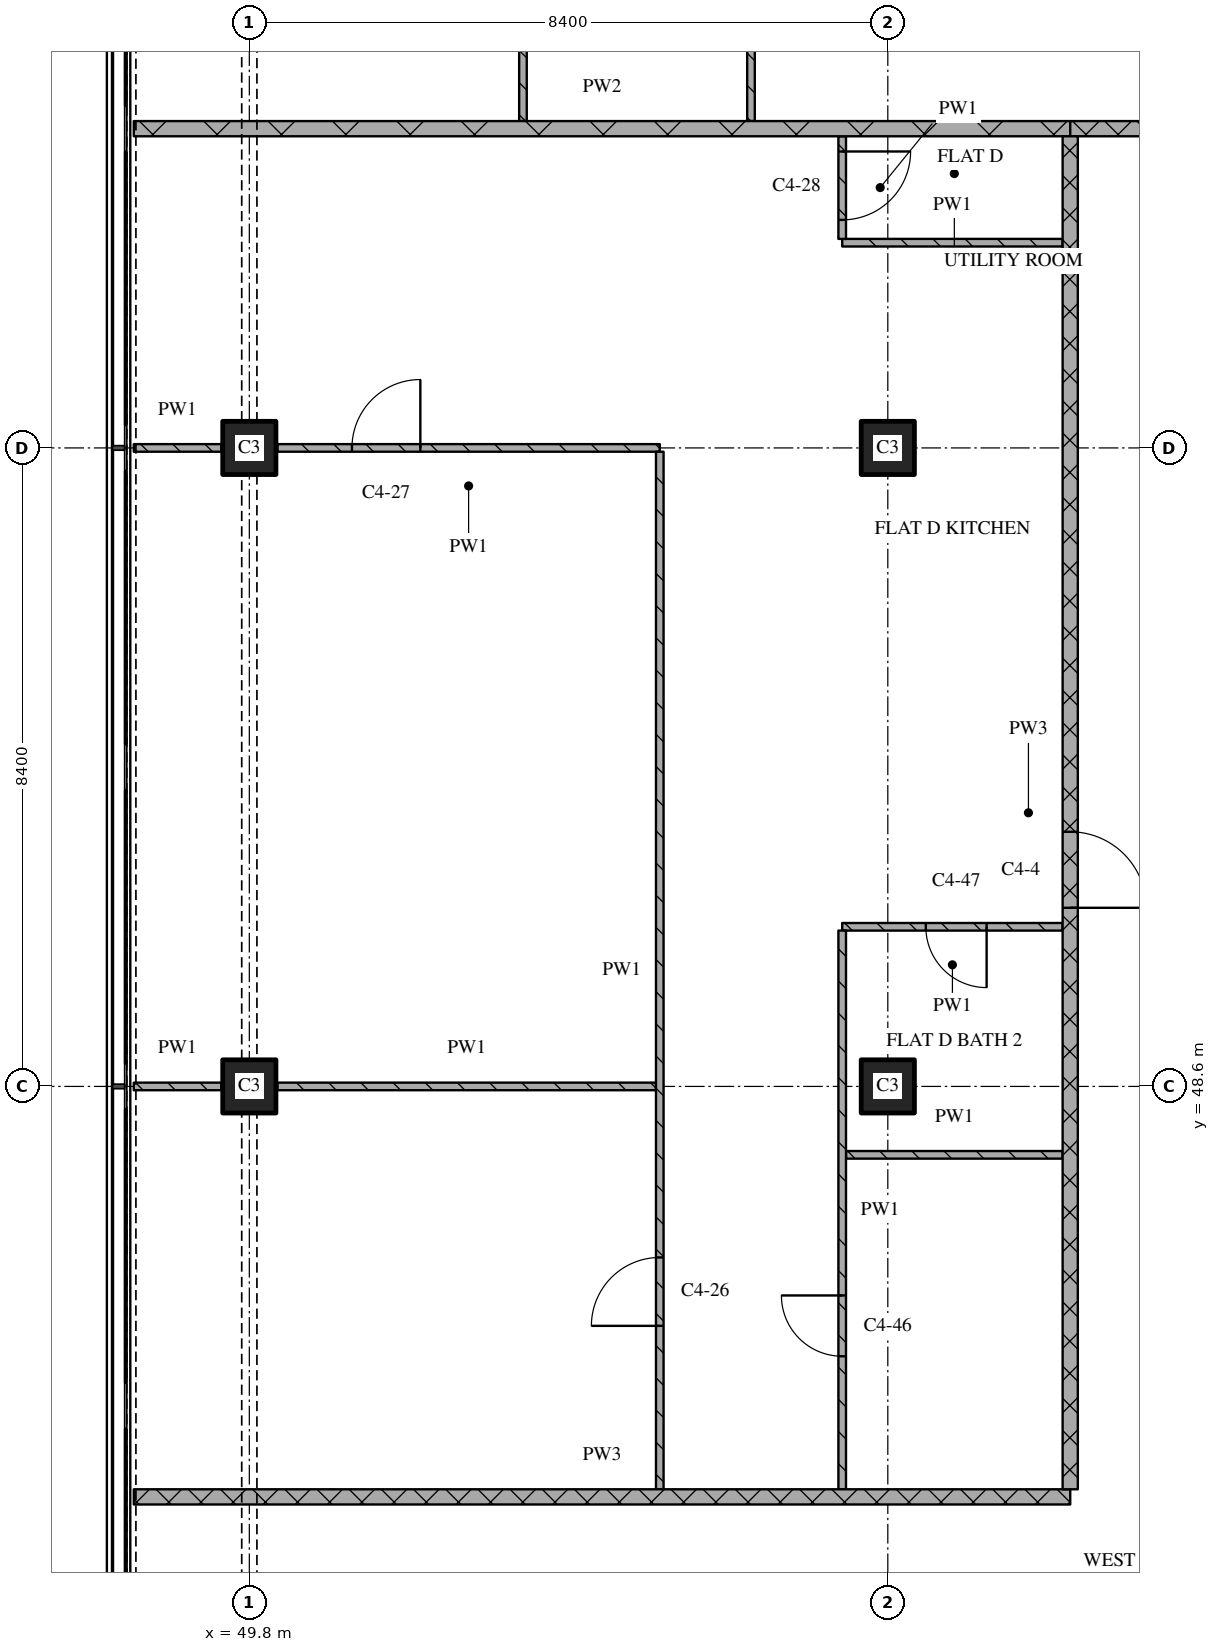
"""IFC4 building model, lengths in metres.
Left out: names, types, materials, properties, quantities, classifications, styles, units other than length and angle.
Written with IfcOpenShell. Run it as: python <this file> out.ifc"""

import sys

from ifc_helpers import new_model, si_unit, direction, frame, frame_2d, origin, origin_2d, place, context, subcontext, project, spatial, rectangle, extrude, element, fill, save


model = new_model("IFC4")
c1 = context("Model", 3, precision=1e-05, world=origin(), true_north=direction((0.0, 1.0)))
c2 = subcontext(c1, "Body", "Model", "MODEL_VIEW")
j1 = project(units=[si_unit("LENGTHUNIT", "METRE"), si_unit("PLANEANGLEUNIT", "RADIAN")], contexts=[c1])
p1 = place(None, origin())
s1 = spatial("IfcSite", under=j1, at=p1, CompositionType="ELEMENT")
p2 = place(p1, origin())
s2 = spatial("IfcBuilding", under=s1, at=p2, CompositionType="ELEMENT")
p3 = place(p2, frame((0.0, 0.0, 179.85)))
s3 = spatial("IfcBuildingStorey", under=s2, at=p3, CompositionType="ELEMENT", Elevation=179.85)
for number, where, z_axis, x_axis in (
    (1, (49.8, 48.6, 0.0), (0.0, 0.0, 1.0), (1.0, 0.0, 0.0)),
    (2, (49.8, 57.0, 0.0), (0.0, 0.0, 1.0), (1.0, 0.0, 0.0)),
    (3, (58.2, 48.6, 0.0), (0.0, 0.0, 1.0), (1.0, 0.0, 0.0)),
    (4, (58.2, 57.0, 0.0), (0.0, 0.0, 1.0), (1.0, 0.0, 0.0)),
):
    element("IfcColumn", number, at=place(p3, frame(where, z_axis=z_axis, x_axis=x_axis)), inside=s3, PredefinedType="COLUMN", context=c2, shape_type="SweptSolid", body=[
        extrude(rectangle(XDim=0.7, YDim=0.7, at=origin_2d()), origin(), (0.0, 0.0, 1.0), 3.6),
    ])
p4 = place(p3, frame((48.28, 43.2, 0.0), z_axis=(0.0, 0.0, 1.0), x_axis=(1.0, 0.0, 0.0)))
e5 = element("IfcWall", 5, at=p4, inside=s3, PredefinedType="PARTITIONING", context=c2, shape_type="SweptSolid", body=[
    extrude(rectangle(XDim=12.32, YDim=0.2, at=frame_2d((6.16, 0.0))), origin(), (0.0, 0.0, 1.0), 3.32),
])
p5 = place(p3, frame((57.65, 47.7, 0.0), z_axis=(0.0, 0.0, 1.0), x_axis=(1.0, 0.0, 0.0)))
e6 = element("IfcWall", 6, at=p5, inside=s3, PredefinedType="PARTITIONING", context=c2, shape_type="SweptSolid", body=[
    extrude(rectangle(XDim=2.85, YDim=0.1, at=frame_2d((1.425, 0.0))), origin(), (0.0, 0.0, 1.0), 3.32),
])
p6 = place(p3, frame((48.28, 48.6, 0.0), z_axis=(0.0, 0.0, 1.0), x_axis=(1.0, 0.0, 0.0)))
e7 = element("IfcWall", 7, at=p6, inside=s3, PredefinedType="PARTITIONING", context=c2, shape_type="SweptSolid", body=[
    extrude(rectangle(XDim=1.15, YDim=0.1, at=frame_2d((0.575, 0.0))), origin(), (0.0, 0.0, 1.0), 3.32),
])
p7 = place(p3, frame((50.17, 48.6, 0.0), z_axis=(0.0, 0.0, 1.0), x_axis=(1.0, 0.0, 0.0)))
e8 = element("IfcWall", 8, at=p7, inside=s3, PredefinedType="PARTITIONING", context=c2, shape_type="SweptSolid", body=[
    extrude(rectangle(XDim=4.98, YDim=0.1, at=frame_2d((2.49, 0.0))), origin(), (0.0, 0.0, 1.0), 3.32),
])
p8 = place(p3, frame((60.5, 50.7, 0.0), z_axis=(0.0, 0.0, 1.0), x_axis=(-1.0, 0.0, 0.0)))
e9 = element("IfcWall", 9, at=p8, inside=s3, PredefinedType="PARTITIONING", context=c2, shape_type="SweptSolid", body=[
    extrude(rectangle(XDim=2.9, YDim=0.1, at=frame_2d((1.45, 0.0))), origin(), (0.0, 0.0, 1.0), 3.32),
])
p9 = place(p8, frame((1.0, 0.0, 0.0)))
e10 = element("IfcOpeningElement", 10, at=p9, cuts=e9, PredefinedType="OPENING", context=c2, shape_type="SweptSolid", body=[
    extrude(rectangle(XDim=0.8, YDim=2.1, at=frame_2d((0.4, 1.05))), frame((0.0, 0.06, 0.0), z_axis=(0.0, -1.0, 0.0), x_axis=(1.0, 0.0, 0.0)), (0.0, 0.0, 1.0), 0.12),
])
p10 = place(p3, frame((48.28, 57.0, 0.0), z_axis=(0.0, 0.0, 1.0), x_axis=(1.0, 0.0, 0.0)))
e11 = element("IfcWall", 11, at=p10, inside=s3, PredefinedType="PARTITIONING", context=c2, shape_type="SweptSolid", body=[
    extrude(rectangle(XDim=1.15, YDim=0.1, at=frame_2d((0.575, 0.0))), origin(), (0.0, 0.0, 1.0), 3.32),
])
p11 = place(p3, frame((55.2, 57.0, 0.0), z_axis=(0.0, 0.0, 1.0), x_axis=(-1.0, 0.0, 0.0)))
e12 = element("IfcWall", 12, at=p11, inside=s3, PredefinedType="PARTITIONING", context=c2, shape_type="SweptSolid", body=[
    extrude(rectangle(XDim=5.03, YDim=0.1, at=frame_2d((2.515, 0.0))), origin(), (0.0, 0.0, 1.0), 3.32),
])
p12 = place(p11, frame((3.15, 0.0, 0.0)))
e13 = element("IfcOpeningElement", 13, at=p12, cuts=e12, PredefinedType="OPENING", context=c2, shape_type="SweptSolid", body=[
    extrude(rectangle(XDim=0.9, YDim=2.1, at=frame_2d((0.45, 1.05))), frame((0.0, 0.06, 0.0), z_axis=(0.0, -1.0, 0.0), x_axis=(1.0, 0.0, 0.0)), (0.0, 0.0, 1.0), 0.12),
])
p13 = place(p3, frame((57.6, 59.7, 0.0), z_axis=(0.0, 0.0, 1.0), x_axis=(1.0, 0.0, 0.0)))
e14 = element("IfcWall", 14, at=p13, inside=s3, PredefinedType="PARTITIONING", context=c2, shape_type="SweptSolid", body=[
    extrude(rectangle(XDim=2.9, YDim=0.1, at=frame_2d((1.45, 0.0))), origin(), (0.0, 0.0, 1.0), 3.32),
])
p14 = place(p3, frame((60.6, 61.2, 0.0), z_axis=(0.0, 0.0, 1.0), x_axis=(1.0, 0.0, 0.0)))
e15 = element("IfcWall", 15, at=p14, inside=s3, PredefinedType="PARTITIONING", context=c2, shape_type="SweptSolid", body=[
    extrude(rectangle(XDim=3.6, YDim=0.2, at=frame_2d((1.8, 0.0))), origin(), (0.0, 0.0, 1.0), 3.32),
])
p15 = place(p3, frame((48.28, 61.2, 0.0), z_axis=(0.0, 0.0, 1.0), x_axis=(1.0, 0.0, 0.0)))
e16 = element("IfcWall", 16, at=p15, inside=s3, PredefinedType="PARTITIONING", context=c2, shape_type="SweptSolid", body=[
    extrude(rectangle(XDim=12.32, YDim=0.2, at=frame_2d((6.16, 0.0))), origin(), (0.0, 0.0, 1.0), 3.32),
])
p16 = place(p3, frame((53.4, 65.35, 0.0), z_axis=(0.0, 0.0, 1.0), x_axis=(0.0, -1.0, 0.0)))
e17 = element("IfcWall", 17, at=p16, inside=s3, PredefinedType="PARTITIONING", context=c2, shape_type="SweptSolid", body=[
    extrude(rectangle(XDim=4.05, YDim=0.1, at=frame_2d((2.025, 0.0))), origin(), (0.0, 0.0, 1.0), 3.32),
])
p17 = place(p3, frame((55.2, 43.3, 0.0), z_axis=(0.0, 0.0, 1.0), x_axis=(0.0, 1.0, 0.0)))
e18 = element("IfcWall", 18, at=p17, inside=s3, PredefinedType="PARTITIONING", context=c2, shape_type="SweptSolid", body=[
    extrude(rectangle(XDim=13.65, YDim=0.1, at=frame_2d((6.825, 0.0))), origin(), (0.0, 0.0, 1.0), 3.32),
])
p18 = place(p17, frame((2.15, 0.0, 0.0)))
e19 = element("IfcOpeningElement", 19, at=p18, cuts=e18, PredefinedType="OPENING", context=c2, shape_type="SweptSolid", body=[
    extrude(rectangle(XDim=0.9, YDim=2.1, at=frame_2d((0.45, 1.05))), frame((0.0, 0.06, 0.0), z_axis=(0.0, -1.0, 0.0), x_axis=(1.0, 0.0, 0.0)), (0.0, 0.0, 1.0), 0.12),
])
p19 = place(p3, frame((56.4, 64.45, 0.0), z_axis=(0.0, 0.0, 1.0), x_axis=(0.0, -1.0, 0.0)))
e20 = element("IfcWall", 20, at=p19, inside=s3, PredefinedType="PARTITIONING", context=c2, shape_type="SweptSolid", body=[
    extrude(rectangle(XDim=3.15, YDim=0.1, at=frame_2d((1.575, 0.0))), origin(), (0.0, 0.0, 1.0), 3.32),
])
p20 = place(p3, frame((57.6, 50.65, 0.0), z_axis=(0.0, 0.0, 1.0), x_axis=(0.0, -1.0, 0.0)))
e21 = element("IfcWall", 21, at=p20, inside=s3, PredefinedType="PARTITIONING", context=c2, shape_type="SweptSolid", body=[
    extrude(rectangle(XDim=7.35, YDim=0.1, at=frame_2d((3.675, 0.0))), origin(), (0.0, 0.0, 1.0), 3.32),
])
p21 = place(p20, frame((4.8, 0.0, 0.0)))
e22 = element("IfcOpeningElement", 22, at=p21, cuts=e21, PredefinedType="OPENING", context=c2, shape_type="SweptSolid", body=[
    extrude(rectangle(XDim=0.8, YDim=2.1, at=frame_2d((0.4, 1.05))), frame((0.0, 0.06, 0.0), z_axis=(0.0, -1.0, 0.0), x_axis=(1.0, 0.0, 0.0)), (0.0, 0.0, 1.0), 0.12),
])
p22 = place(p3, frame((57.6, 61.1, 0.0), z_axis=(0.0, 0.0, 1.0), x_axis=(0.0, -1.0, 0.0)))
e23 = element("IfcWall", 23, at=p22, inside=s3, PredefinedType="PARTITIONING", context=c2, shape_type="SweptSolid", body=[
    extrude(rectangle(XDim=1.35, YDim=0.1, at=frame_2d((0.675, 0.0))), origin(), (0.0, 0.0, 1.0), 3.32),
])
p23 = place(p22, frame((0.2, 0.0, 0.0)))
e24 = element("IfcOpeningElement", 24, at=p23, cuts=e23, PredefinedType="OPENING", context=c2, shape_type="SweptSolid", body=[
    extrude(rectangle(XDim=0.9, YDim=2.1, at=frame_2d((0.45, 1.05))), frame((0.0, 0.06, 0.0), z_axis=(0.0, -1.0, 0.0), x_axis=(1.0, 0.0, 0.0)), (0.0, 0.0, 1.0), 0.12),
])
p24 = place(p3, frame((60.6, 43.3, 0.0), z_axis=(0.0, 0.0, 1.0), x_axis=(0.0, 1.0, 0.0)))
e25 = element("IfcWall", 25, at=p24, inside=s3, PredefinedType="PARTITIONING", context=c2, shape_type="SweptSolid", body=[
    extrude(rectangle(XDim=17.8, YDim=0.2, at=frame_2d((8.9, 0.0))), origin(), (0.0, 0.0, 1.0), 3.32),
])
p25 = place(p24, frame((7.65, 0.0, 0.0)))
e26 = element("IfcOpeningElement", 26, at=p25, cuts=e25, PredefinedType="OPENING", context=c2, shape_type="SweptSolid", body=[
    extrude(rectangle(XDim=1.0, YDim=2.1, at=frame_2d((0.5, 1.05))), frame((0.0, 0.11, 0.0), z_axis=(0.0, -1.0, 0.0), x_axis=(1.0, 0.0, 0.0)), (0.0, 0.0, 1.0), 0.22),
])
p26 = place(p9, origin())
e27 = element("IfcDoor", 27, at=p26, inside=s3, OperationType="SINGLE_SWING_LEFT", PredefinedType="DOOR", context=c2, shape_type="SweptSolid", body=[
    extrude(rectangle(XDim=0.8, YDim=2.1, at=frame_2d((0.4, 1.05))), frame((0.0, 0.025, 0.0), z_axis=(0.0, -1.0, 0.0), x_axis=(1.0, 0.0, 0.0)), (0.0, 0.0, 1.0), 0.05),
])
fill(e10, e27)
p27 = place(p12, origin())
e28 = element("IfcDoor", 28, at=p27, inside=s3, OperationType="SINGLE_SWING_RIGHT", PredefinedType="DOOR", context=c2, shape_type="SweptSolid", body=[
    extrude(rectangle(XDim=0.9, YDim=2.1, at=frame_2d((0.45, 1.05))), frame((0.0, 0.025, 0.0), z_axis=(0.0, -1.0, 0.0), x_axis=(1.0, 0.0, 0.0)), (0.0, 0.0, 1.0), 0.05),
])
fill(e13, e28)
p28 = place(p18, origin())
e29 = element("IfcDoor", 29, at=p28, inside=s3, OperationType="SINGLE_SWING_LEFT", PredefinedType="DOOR", context=c2, shape_type="SweptSolid", body=[
    extrude(rectangle(XDim=0.9, YDim=2.1, at=frame_2d((0.45, 1.05))), frame((0.0, 0.025, 0.0), z_axis=(0.0, -1.0, 0.0), x_axis=(1.0, 0.0, 0.0)), (0.0, 0.0, 1.0), 0.05),
])
fill(e19, e29)
p29 = place(p21, origin())
e30 = element("IfcDoor", 30, at=p29, inside=s3, OperationType="SINGLE_SWING_RIGHT", PredefinedType="DOOR", context=c2, shape_type="SweptSolid", body=[
    extrude(rectangle(XDim=0.8, YDim=2.1, at=frame_2d((0.4, 1.05))), frame((0.0, 0.025, 0.0), z_axis=(0.0, -1.0, 0.0), x_axis=(1.0, 0.0, 0.0)), (0.0, 0.0, 1.0), 0.05),
])
fill(e22, e30)
p30 = place(p23, origin())
e31 = element("IfcDoor", 31, at=p30, inside=s3, OperationType="SINGLE_SWING_LEFT", PredefinedType="DOOR", context=c2, shape_type="SweptSolid", body=[
    extrude(rectangle(XDim=0.9, YDim=2.1, at=frame_2d((0.45, 1.05))), frame((0.0, 0.025, 0.0), z_axis=(0.0, -1.0, 0.0), x_axis=(1.0, 0.0, 0.0)), (0.0, 0.0, 1.0), 0.05),
])
fill(e24, e31)
p31 = place(p25, origin())
e32 = element("IfcDoor", 32, at=p31, inside=s3, OperationType="SINGLE_SWING_RIGHT", PredefinedType="DOOR", context=c2, shape_type="SweptSolid", body=[
    extrude(rectangle(XDim=1.0, YDim=2.1, at=frame_2d((0.5, 1.05))), frame((0.0, 0.025, 0.0), z_axis=(0.0, -1.0, 0.0), x_axis=(1.0, 0.0, 0.0)), (0.0, 0.0, 1.0), 0.05),
])
fill(e26, e32)
save(model, sys.argv[1])
